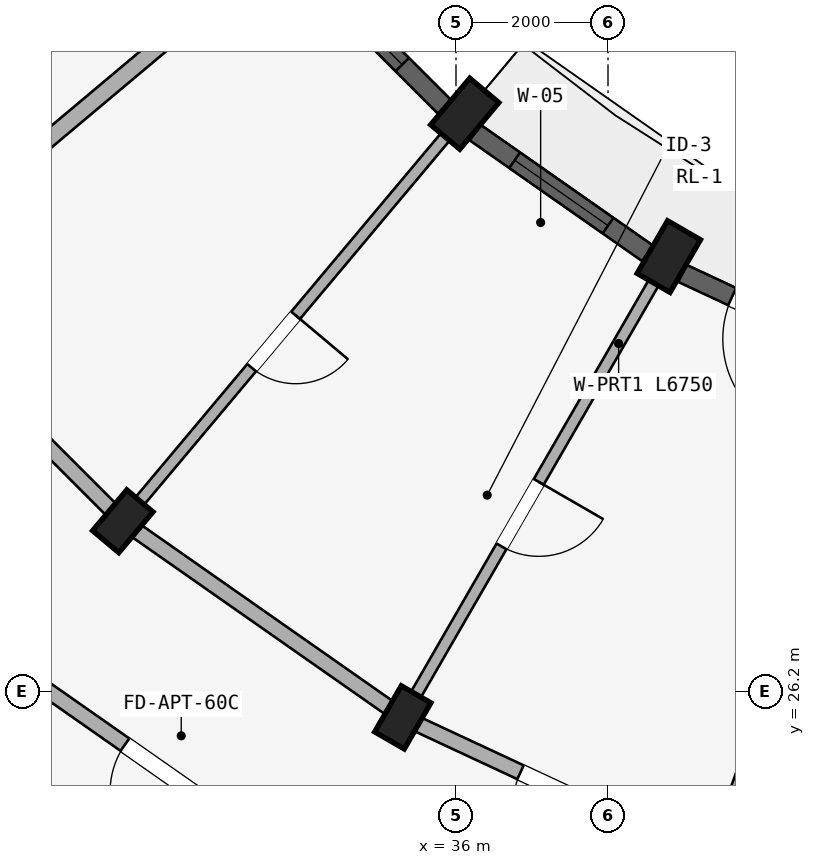
"""IFC4 building model, lengths in metres.
Left out: names, types, materials, properties, quantities, classifications, styles, units other than length and angle.
Written with IfcOpenShell. Run it as: python <this file> out.ifc"""

import sys

from ifc_helpers import new_model, si_unit, direction, frame, frame_2d, origin, origin_2d, place, context, subcontext, project, spatial, rectangle, extrude, element, fill, save


model = new_model("IFC4")
c1 = context("Model", 3, precision=1e-05, world=origin(), true_north=direction((0.0, 1.0)))
c2 = subcontext(c1, "Body", "Model", "MODEL_VIEW")
j1 = project(units=[si_unit("LENGTHUNIT", "METRE"), si_unit("PLANEANGLEUNIT", "RADIAN")], contexts=[c1])
p1 = place(None, origin())
s1 = spatial("IfcSite", under=j1, at=p1, CompositionType="ELEMENT")
p2 = place(p1, origin())
s2 = spatial("IfcBuilding", under=s1, at=p2, CompositionType="ELEMENT")
p3 = place(p2, frame((0.0, 0.0, 24.45)))
s3 = spatial("IfcBuildingStorey", under=s2, at=p3, CompositionType="ELEMENT", Elevation=24.45)
p4 = place(p3, frame((38.8, 31.919, 0.0), z_axis=(0.0, 0.0, 1.0), x_axis=(-0.866025403784, 0.5, 0.0)))
e1 = element("IfcColumn", 1, at=p4, inside=s3, PredefinedType="COLUMN", context=c2, shape_type="SweptSolid", body=[
    extrude(rectangle(XDim=0.5, YDim=0.8, at=origin_2d()), origin(), (0.0, 0.0, 1.0), 2.93),
])
p5 = place(p3, frame((35.3, 25.856, 0.0), z_axis=(0.0, 0.0, 1.0), x_axis=(-0.866025403784, 0.5, 0.0)))
e2 = element("IfcColumn", 2, at=p5, inside=s3, PredefinedType="COLUMN", context=c2, shape_type="SweptSolid", body=[
    extrude(rectangle(XDim=0.45, YDim=0.7, at=origin_2d()), origin(), (0.0, 0.0, 1.0), 2.93),
])
p6 = place(p3, frame((36.115, 33.798, 0.0), z_axis=(0.0, 0.0, 1.0), x_axis=(-0.766044443119, 0.642787609687, 0.0)))
e3 = element("IfcColumn", 3, at=p6, inside=s3, PredefinedType="COLUMN", context=c2, shape_type="SweptSolid", body=[
    extrude(rectangle(XDim=0.5, YDim=0.8, at=origin_2d()), origin(), (0.0, 0.0, 1.0), 2.93),
])
p7 = place(p3, frame((31.616, 28.436, 0.0), z_axis=(0.0, 0.0, 1.0), x_axis=(-0.766044443119, 0.642787609687, 0.0)))
e4 = element("IfcColumn", 4, at=p7, inside=s3, PredefinedType="COLUMN", context=c2, shape_type="SweptSolid", body=[
    extrude(rectangle(XDim=0.45, YDim=0.7, at=origin_2d()), origin(), (0.0, 0.0, 1.0), 2.93),
])
p8 = place(p3, frame((39.376, 23.956, 0.0), z_axis=(0.0, 0.0, 1.0), x_axis=(-0.906307919131, 0.422617978463, 0.0)))
e5 = element("IfcWall", 5, at=p8, inside=s3, PredefinedType="STANDARD", context=c2, shape_type="SweptSolid", body=[
    extrude(rectangle(XDim=4.497, YDim=0.2, at=frame_2d((2.249, 0.0))), origin(), (0.0, 0.0, 1.0), 2.372),
])
p9 = place(p8, frame((1.709, 0.0, 0.0)))
e6 = element("IfcOpeningElement", 6, at=p9, cuts=e5, PredefinedType="OPENING", context=c2, shape_type="SweptSolid", body=[
    extrude(rectangle(XDim=1.08, YDim=2.15, at=frame_2d((0.54, 1.075))), frame((0.0, 0.11, 0.0), z_axis=(0.0, -1.0, 0.0), x_axis=(1.0, 0.0, 0.0)), (0.0, 0.0, 1.0), 0.22),
])
p10 = place(p3, frame((35.3, 25.856, 0.0), z_axis=(0.0, 0.0, 1.0), x_axis=(-0.819155404658, 0.573571637217, 0.0)))
e7 = element("IfcWall", 7, at=p10, inside=s3, PredefinedType="STANDARD", context=c2, shape_type="SweptSolid", body=[
    extrude(rectangle(XDim=4.497, YDim=0.2, at=frame_2d((2.249, 0.0))), origin(), (0.0, 0.0, 1.0), 2.372),
])
p11 = place(p3, frame((34.1, 23.778, 0.0), z_axis=(0.0, 0.0, 1.0), x_axis=(-0.819140911474, 0.573592335331, 0.0)))
e8 = element("IfcWall", 8, at=p11, inside=s3, PredefinedType="STANDARD", context=c2, shape_type="SweptSolid", body=[
    extrude(rectangle(XDim=4.916, YDim=0.2, at=frame_2d((2.458, 0.0))), origin(), (0.0, 0.0, 1.0), 2.372),
])
p12 = place(p11, frame((1.918, 0.0, 0.0)))
e9 = element("IfcOpeningElement", 9, at=p12, cuts=e8, PredefinedType="OPENING", context=c2, shape_type="SweptSolid", body=[
    extrude(rectangle(XDim=1.08, YDim=2.15, at=frame_2d((0.54, 1.075))), frame((0.0, 0.11, 0.0), z_axis=(0.0, -1.0, 0.0), x_axis=(1.0, 0.0, 0.0)), (0.0, 0.0, 1.0), 0.22),
])
p13 = place(p3, frame((31.616, 28.436, 0.0), z_axis=(0.0, 0.0, 1.0), x_axis=(-0.707106781187, 0.707106781187, 0.0)))
e10 = element("IfcWall", 10, at=p13, inside=s3, PredefinedType="STANDARD", context=c2, shape_type="SweptSolid", body=[
    extrude(rectangle(XDim=4.497, YDim=0.2, at=frame_2d((2.249, 0.0))), origin(), (0.0, 0.0, 1.0), 2.372),
])
p14 = place(p3, frame((41.702, 30.346, 0.0), z_axis=(0.0, 0.0, 1.0), x_axis=(-0.342010221662, -0.939696231917, 0.0)))
e11 = element("IfcWall", 11, at=p14, inside=s3, PredefinedType="STANDARD", context=c2, shape_type="SweptSolid", body=[
    extrude(rectangle(XDim=6.75, YDim=0.22, at=frame_2d((3.375, 0.0))), origin(), (0.0, 0.0, 1.0), 2.372),
])
p15 = place(p3, frame((38.7, 31.746, 0.0), z_axis=(0.0, 0.0, 1.0), x_axis=(-0.499997969693, -0.866026575979, 0.0)))
e12 = element("IfcWall", 12, at=p15, inside=s3, PredefinedType="PARTITIONING", context=c2, shape_type="SweptSolid", body=[
    extrude(rectangle(XDim=6.75, YDim=0.15, at=frame_2d((3.375, 0.0))), origin(), (0.0, 0.0, 1.0), 2.372),
])
p16 = place(p15, frame((3.222, 0.0, 0.0)))
e13 = element("IfcOpeningElement", 13, at=p16, cuts=e12, PredefinedType="OPENING", context=c2, shape_type="SweptSolid", body=[
    extrude(rectangle(XDim=0.98, YDim=2.12, at=frame_2d((0.49, 1.06))), frame((0.0, 0.085, 0.0), z_axis=(0.0, -1.0, 0.0), x_axis=(1.0, 0.0, 0.0)), (0.0, 0.0, 1.0), 0.17),
])
p17 = place(p3, frame((35.987, 33.645, 0.0), z_axis=(0.0, 0.0, 1.0), x_axis=(-0.642784846501, -0.766046761698, 0.0)))
e14 = element("IfcWall", 14, at=p17, inside=s3, PredefinedType="PARTITIONING", context=c2, shape_type="SweptSolid", body=[
    extrude(rectangle(XDim=6.75, YDim=0.15, at=frame_2d((3.375, 0.0))), origin(), (0.0, 0.0, 1.0), 2.372),
])
p18 = place(p17, frame((3.262, 0.0, 0.0)))
e15 = element("IfcOpeningElement", 15, at=p18, cuts=e14, PredefinedType="OPENING", context=c2, shape_type="SweptSolid", body=[
    extrude(rectangle(XDim=0.9, YDim=2.1, at=frame_2d((0.45, 1.05))), frame((0.0, 0.085, 0.0), z_axis=(0.0, -1.0, 0.0), x_axis=(1.0, 0.0, 0.0)), (0.0, 0.0, 1.0), 0.17),
])
p19 = place(p3, frame((33.645, 35.987, 0.0), z_axis=(0.0, 0.0, 1.0), x_axis=(-0.766046761698, -0.642784846501, 0.0)))
e16 = element("IfcWall", 16, at=p19, inside=s3, PredefinedType="STANDARD", context=c2, shape_type="SweptSolid", body=[
    extrude(rectangle(XDim=6.75, YDim=0.22, at=frame_2d((3.375, 0.0))), origin(), (0.0, 0.0, 1.0), 2.372),
])
p20 = place(p3, frame((41.487, 30.528, 0.0), z_axis=(0.0, 0.0, 1.0), x_axis=(-0.906293449611, 0.422649007088, 0.0)))
e17 = element("IfcWall", 17, at=p20, inside=s3, PredefinedType="STANDARD", context=c2, shape_type="SweptSolid", body=[
    extrude(rectangle(XDim=2.77, YDim=0.25, at=frame_2d((1.385, 0.0))), origin(), (0.0, 0.0, 1.0), 2.422),
])
p21 = place(p20, frame((0.725, 0.0, 0.0)))
e18 = element("IfcOpeningElement", 18, at=p21, cuts=e17, PredefinedType="OPENING", context=c2, shape_type="SweptSolid", body=[
    extrude(rectangle(XDim=1.32, YDim=2.15, at=frame_2d((0.66, 1.075))), frame((0.0, 0.135, 0.0), z_axis=(0.0, -1.0, 0.0), x_axis=(1.0, 0.0, 0.0)), (0.0, 0.0, 1.0), 0.27),
])
p22 = place(p3, frame((38.521, 31.962, 0.0), z_axis=(0.0, 0.0, 1.0), x_axis=(-0.819111815273, 0.573633885053, 0.0)))
e19 = element("IfcWall", 19, at=p22, inside=s3, PredefinedType="STANDARD", context=c2, shape_type="SweptSolid", body=[
    extrude(rectangle(XDim=2.77, YDim=0.25, at=frame_2d((1.385, 0.0))), origin(), (0.0, 0.0, 1.0), 2.422),
])
p23 = place(p22, frame((0.635, 0.0, 0.572)))
e20 = element("IfcOpeningElement", 20, at=p23, cuts=e19, PredefinedType="OPENING", context=c2, shape_type="SweptSolid", body=[
    extrude(rectangle(XDim=1.5, YDim=1.65, at=frame_2d((0.75, 0.825))), frame((0.0, 0.135, 0.0), z_axis=(0.0, -1.0, 0.0), x_axis=(1.0, 0.0, 0.0)), (0.0, 0.0, 1.0), 0.27),
])
p24 = place(p3, frame((35.848, 33.889, 0.0), z_axis=(0.0, 0.0, 1.0), x_axis=(-0.707106781187, 0.707106781187, 0.0)))
e21 = element("IfcWall", 21, at=p24, inside=s3, PredefinedType="STANDARD", context=c2, shape_type="SweptSolid", body=[
    extrude(rectangle(XDim=2.77, YDim=0.25, at=frame_2d((1.385, 0.0))), origin(), (0.0, 0.0, 1.0), 2.422),
])
p25 = place(p24, frame((0.785, 0.0, 0.722)))
e22 = element("IfcOpeningElement", 22, at=p25, cuts=e21, PredefinedType="OPENING", context=c2, shape_type="SweptSolid", body=[
    extrude(rectangle(XDim=1.2, YDim=1.5, at=frame_2d((0.6, 0.75))), frame((0.0, 0.135, 0.0), z_axis=(0.0, -1.0, 0.0), x_axis=(1.0, 0.0, 0.0)), (0.0, 0.0, 1.0), 0.27),
])
p26 = place(p23, origin())
e23 = element("IfcWindow", 23, at=p26, inside=s3, PartitioningType="DOUBLE_PANEL_VERTICAL", PredefinedType="WINDOW", context=c2, shape_type="SweptSolid", body=[
    extrude(rectangle(XDim=1.5, YDim=1.65, at=frame_2d((0.75, 0.825))), frame((0.0, 0.03, 0.0), z_axis=(0.0, -1.0, 0.0), x_axis=(1.0, 0.0, 0.0)), (0.0, 0.0, 1.0), 0.06),
])
fill(e20, e23)
p27 = place(p25, origin())
e24 = element("IfcWindow", 24, at=p27, inside=s3, PartitioningType="SINGLE_PANEL", PredefinedType="WINDOW", context=c2, shape_type="SweptSolid", body=[
    extrude(rectangle(XDim=1.2, YDim=1.5, at=frame_2d((0.6, 0.75))), frame((0.0, 0.03, 0.0), z_axis=(0.0, -1.0, 0.0), x_axis=(1.0, 0.0, 0.0)), (0.0, 0.0, 1.0), 0.06),
])
fill(e22, e24)
p28 = place(p16, origin())
e25 = element("IfcDoor", 25, at=p28, inside=s3, OperationType="SINGLE_SWING_LEFT", PredefinedType="DOOR", context=c2, shape_type="SweptSolid", body=[
    extrude(rectangle(XDim=0.98, YDim=2.12, at=frame_2d((0.49, 1.06))), frame((0.0, 0.025, 0.0), z_axis=(0.0, -1.0, 0.0), x_axis=(1.0, 0.0, 0.0)), (0.0, 0.0, 1.0), 0.05),
])
fill(e13, e25)
p29 = place(p18, frame((0.9, 0.0, 0.0), z_axis=(0.0, 0.0, 1.0), x_axis=(-1.0, 0.0, 0.0)))
e26 = element("IfcDoor", 26, at=p29, inside=s3, OperationType="SINGLE_SWING_RIGHT", PredefinedType="DOOR", context=c2, shape_type="SweptSolid", body=[
    extrude(rectangle(XDim=0.9, YDim=2.1, at=frame_2d((0.45, 1.05))), frame((0.0, 0.025, 0.0), z_axis=(0.0, -1.0, 0.0), x_axis=(1.0, 0.0, 0.0)), (0.0, 0.0, 1.0), 0.05),
])
fill(e15, e26)
p30 = place(p12, origin())
e27 = element("IfcDoor", 27, at=p30, inside=s3, OperationType="SINGLE_SWING_LEFT", PredefinedType="DOOR", context=c2, shape_type="SweptSolid", body=[
    extrude(rectangle(XDim=1.08, YDim=2.15, at=frame_2d((0.54, 1.075))), frame((0.0, 0.025, 0.0), z_axis=(0.0, -1.0, 0.0), x_axis=(1.0, 0.0, 0.0)), (0.0, 0.0, 1.0), 0.05),
])
fill(e9, e27)
p31 = place(p9, frame((1.08, 0.0, 0.0), z_axis=(0.0, 0.0, 1.0), x_axis=(-1.0, 0.0, 0.0)))
e28 = element("IfcDoor", 28, at=p31, inside=s3, OperationType="SINGLE_SWING_RIGHT", PredefinedType="DOOR", context=c2, shape_type="SweptSolid", body=[
    extrude(rectangle(XDim=1.08, YDim=2.15, at=frame_2d((0.54, 1.075))), frame((0.0, 0.025, 0.0), z_axis=(0.0, -1.0, 0.0), x_axis=(1.0, 0.0, 0.0)), (0.0, 0.0, 1.0), 0.05),
])
fill(e6, e28)
p32 = place(p21, frame((1.32, 0.0, 0.0), z_axis=(0.0, 0.0, 1.0), x_axis=(-1.0, 0.0, 0.0)))
e29 = element("IfcDoor", 29, at=p32, inside=s3, OperationType="SINGLE_SWING_RIGHT", PredefinedType="DOOR", context=c2, shape_type="SweptSolid", body=[
    extrude(rectangle(XDim=1.32, YDim=2.15, at=frame_2d((0.66, 1.075))), frame((0.0, 0.025, 0.0), z_axis=(0.0, -1.0, 0.0), x_axis=(1.0, 0.0, 0.0)), (0.0, 0.0, 1.0), 0.05),
])
fill(e18, e29)
save(model, sys.argv[1])
